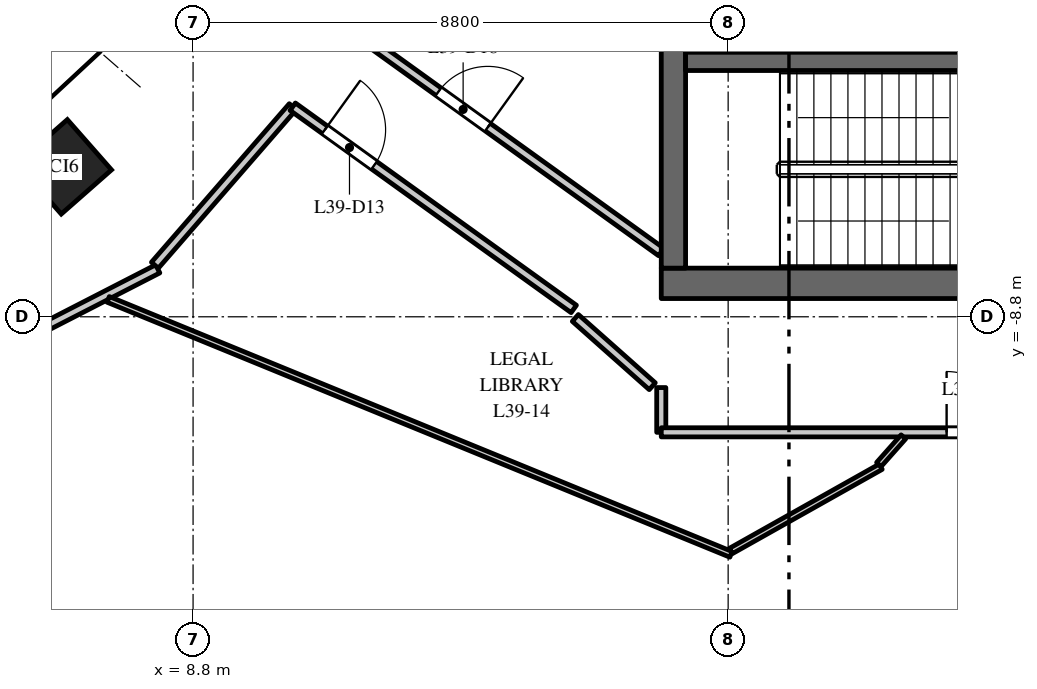
"""IFC4 building model, lengths in metres.
Left out: names, types, materials, properties, quantities, classifications, styles, units other than length and angle.
Written with IfcOpenShell. Run it as: python <this file> out.ifc"""

import sys

from ifc_helpers import new_model, si_unit, direction, frame, frame_2d, origin, origin_2d, place, context, subcontext, project, spatial, rectangle, extrude, element, fill, save


model = new_model("IFC4")
c1 = context("Model", 3, precision=1e-05, world=origin(), true_north=direction((0.0, 1.0)))
c2 = subcontext(c1, "Body", "Model", "MODEL_VIEW")
j1 = project(units=[si_unit("LENGTHUNIT", "METRE"), si_unit("PLANEANGLEUNIT", "RADIAN")], contexts=[c1])
p1 = place(None, origin())
s1 = spatial("IfcSite", under=j1, at=p1, CompositionType="ELEMENT")
p2 = place(p1, origin())
s2 = spatial("IfcBuilding", under=s1, at=p2, CompositionType="ELEMENT")
p3 = place(p2, frame((0.0, 0.0, 170.0)))
s3 = spatial("IfcBuildingStorey", under=s2, at=p3, CompositionType="ELEMENT", Elevation=170.0)
p4 = place(p3, frame((6.682, -6.334, 0.0), z_axis=(0.0, 0.0, 1.0), x_axis=(0.75102249095, 0.660276622399, 0.0)))
e1 = element("IfcColumn", 1, at=p4, inside=s3, PredefinedType="COLUMN", context=c2, shape_type="SweptSolid", body=[
    extrude(rectangle(XDim=1.1, YDim=1.1, at=origin_2d()), origin(), (0.0, 0.0, 1.0), 4.0),
])
p5 = place(p3, frame((16.5, -8.25, 0.0), z_axis=(0.0, 0.0, 1.0), x_axis=(1.0, 0.0, 0.0)))
e2 = element("IfcWall", 2, at=p5, inside=s3, PredefinedType="SHEAR", context=c2, shape_type="SweptSolid", body=[
    extrude(rectangle(XDim=15.0, YDim=0.5, at=frame_2d((7.5, 0.0))), origin(), (0.0, 0.0, 1.0), 3.7),
])
p6 = place(p5, frame((6.9, 0.0, 0.0)))
e3 = element("IfcOpeningElement", 3, at=p6, cuts=e2, PredefinedType="OPENING", context=c2, shape_type="SweptSolid", body=[
    extrude(rectangle(XDim=1.2, YDim=2.1, at=frame_2d((0.6, 1.05))), frame((0.0, 0.26, 0.0), z_axis=(0.0, -1.0, 0.0), x_axis=(1.0, 0.0, 0.0)), (0.0, 0.0, 1.0), 0.52),
])
p7 = place(p5, frame((12.275, 0.0, 0.0)))
e4 = element("IfcOpeningElement", 4, at=p7, cuts=e2, PredefinedType="OPENING", context=c2, shape_type="SweptSolid", body=[
    extrude(rectangle(XDim=0.9, YDim=2.1, at=frame_2d((0.45, 1.05))), frame((0.0, 0.26, 0.0), z_axis=(0.0, -1.0, 0.0), x_axis=(1.0, 0.0, 0.0)), (0.0, 0.0, 1.0), 0.52),
])
p8 = place(p3, frame((19.95, -4.45, 0.0), z_axis=(0.0, 0.0, 1.0), x_axis=(0.0, 1.0, 0.0)))
e5 = element("IfcWall", 5, at=p8, inside=s3, PredefinedType="SHEAR", context=c2, shape_type="SweptSolid", body=[
    extrude(rectangle(XDim=8.9, YDim=0.3, at=frame_2d((4.45, 0.0))), origin(), (0.0, 0.0, 1.0), 3.7),
])
p9 = place(p8, frame((0.775, 0.0, 0.0)))
e6 = element("IfcOpeningElement", 6, at=p9, cuts=e5, PredefinedType="OPENING", context=c2, shape_type="SweptSolid", body=[
    extrude(rectangle(XDim=1.2, YDim=2.1, at=frame_2d((0.6, 1.05))), frame((0.0, 0.16, 0.0), z_axis=(0.0, -1.0, 0.0), x_axis=(1.0, 0.0, 0.0)), (0.0, 0.0, 1.0), 0.32),
])
p10 = place(p8, frame((4.675, 0.0, 0.0)))
e7 = element("IfcOpeningElement", 7, at=p10, cuts=e5, PredefinedType="OPENING", context=c2, shape_type="SweptSolid", body=[
    extrude(rectangle(XDim=1.1, YDim=2.1, at=frame_2d((0.55, 1.05))), frame((0.0, 0.16, 0.0), z_axis=(0.0, -1.0, 0.0), x_axis=(1.0, 0.0, 0.0)), (0.0, 0.0, 1.0), 0.32),
])
p11 = place(p8, frame((7.25, 0.0, 0.0)))
e8 = element("IfcOpeningElement", 8, at=p11, cuts=e5, PredefinedType="OPENING", context=c2, shape_type="SweptSolid", body=[
    extrude(rectangle(XDim=1.1, YDim=2.1, at=frame_2d((0.55, 1.05))), frame((0.0, 0.16, 0.0), z_axis=(0.0, -1.0, 0.0), x_axis=(1.0, 0.0, 0.0)), (0.0, 0.0, 1.0), 0.32),
])
p12 = place(p3, frame((16.7, -8.0, 0.0), z_axis=(0.0, 0.0, 1.0), x_axis=(0.0, 1.0, 0.0)))
e9 = element("IfcWall", 9, at=p12, inside=s3, PredefinedType="SHEAR", context=c2, shape_type="SweptSolid", body=[
    extrude(rectangle(XDim=16.0, YDim=0.4, at=frame_2d((8.0, 0.0))), origin(), (0.0, 0.0, 1.0), 3.7),
])
p13 = place(p3, frame((16.9, -4.6, 0.0), z_axis=(0.0, 0.0, 1.0), x_axis=(1.0, 0.0, 0.0)))
e10 = element("IfcWall", 10, at=p13, inside=s3, PredefinedType="SHEAR", context=c2, shape_type="SweptSolid", body=[
    extrude(rectangle(XDim=6.18, YDim=0.3, at=frame_2d((3.09, 0.0))), origin(), (0.0, 0.0, 1.0), 3.7),
])
p14 = place(p13, frame((4.9, 0.0, 0.0)))
e11 = element("IfcOpeningElement", 11, at=p14, cuts=e10, PredefinedType="OPENING", context=c2, shape_type="SweptSolid", body=[
    extrude(rectangle(XDim=1.1, YDim=2.1, at=frame_2d((0.55, 1.05))), frame((0.0, 0.16, 0.0), z_axis=(0.0, -1.0, 0.0), x_axis=(1.0, 0.0, 0.0)), (0.0, 0.0, 1.0), 0.32),
])
p15 = place(p3, frame((4.367, -9.991, 0.0), z_axis=(0.0, 0.0, 1.0), x_axis=(0.889480321924, 0.456973475061, 0.0)))
e12 = element("IfcWall", 12, at=p15, inside=s3, PredefinedType="PARTITIONING", context=c2, shape_type="SweptSolid", body=[
    extrude(rectangle(XDim=4.331, YDim=0.15, at=frame_2d((2.165, 0.0))), origin(), (0.0, 0.0, 1.0), 2.85),
])
p16 = place(p3, frame((7.404, -8.514, 0.0), z_axis=(0.0, 0.0, 1.0), x_axis=(0.925457330517, -0.37885185679, 0.0)))
e13 = element("IfcWall", 13, at=p16, inside=s3, PredefinedType="PARTITIONING", context=c2, shape_type="SweptSolid", body=[
    extrude(rectangle(XDim=11.068, YDim=0.1, at=frame_2d((5.534, 0.0))), origin(), (0.0, 0.0, 1.0), 3.7),
])
p17 = place(p3, frame((8.172, -7.952, 0.0), z_axis=(0.0, 0.0, 1.0), x_axis=(0.656169966724, 0.754613129206, 0.0)))
e14 = element("IfcWall", 14, at=p17, inside=s3, PredefinedType="PARTITIONING", context=c2, shape_type="SweptSolid", body=[
    extrude(rectangle(XDim=3.455, YDim=0.15, at=frame_2d((1.727, 0.0))), origin(), (0.0, 0.0, 1.0), 2.75),
])
p18 = place(p3, frame((10.439, -5.345, 0.0), z_axis=(0.0, 0.0, 1.0), x_axis=(0.811697765448, -0.584077681106, 0.0)))
e15 = element("IfcWall", 15, at=p18, inside=s3, PredefinedType="PARTITIONING", context=c2, shape_type="SweptSolid", body=[
    extrude(rectangle(XDim=5.694, YDim=0.15, at=frame_2d((2.847, 0.0))), origin(), (0.0, 0.0, 1.0), 2.75),
])
p19 = place(p18, frame((0.65, 0.0, 0.0)))
e16 = element("IfcOpeningElement", 16, at=p19, cuts=e15, PredefinedType="OPENING", context=c2, shape_type="SweptSolid", body=[
    extrude(rectangle(XDim=1.0, YDim=2.1, at=frame_2d((0.5, 1.05))), frame((0.0, 0.085, 0.0), z_axis=(0.0, -1.0, 0.0), x_axis=(1.0, 0.0, 0.0)), (0.0, 0.0, 1.0), 0.17),
])
p20 = place(p3, frame((11.291, -3.986, 0.0), z_axis=(0.0, 0.0, 1.0), x_axis=(0.81164111506, -0.584156400584, 0.0)))
e17 = element("IfcWall", 17, at=p20, inside=s3, PredefinedType="PARTITIONING", context=c2, shape_type="SweptSolid", body=[
    extrude(rectangle(XDim=6.418, YDim=0.15, at=frame_2d((3.209, 0.0))), origin(), (0.0, 0.0, 1.0), 3.7),
])
p21 = place(p20, frame((1.903, 0.0, 0.0)))
e18 = element("IfcOpeningElement", 18, at=p21, cuts=e17, PredefinedType="OPENING", context=c2, shape_type="SweptSolid", body=[
    extrude(rectangle(XDim=1.0, YDim=2.1, at=frame_2d((0.5, 1.05))), frame((0.0, 0.085, 0.0), z_axis=(0.0, -1.0, 0.0), x_axis=(1.0, 0.0, 0.0)), (0.0, 0.0, 1.0), 0.17),
])
p22 = place(p3, frame((16.5, -10.7, 0.0), z_axis=(0.0, 0.0, 1.0), x_axis=(0.0, 1.0, 0.0)))
e19 = element("IfcWall", 19, at=p22, inside=s3, PredefinedType="PARTITIONING", context=c2, shape_type="SweptSolid", body=[
    extrude(rectangle(XDim=0.736, YDim=0.15, at=frame_2d((0.368, 0.0))), origin(), (0.0, 0.0, 1.0), 3.7),
])
p23 = place(p3, frame((16.5, -10.7, 0.0), z_axis=(0.0, 0.0, 1.0), x_axis=(1.0, 0.0, 0.0)))
e20 = element("IfcWall", 20, at=p23, inside=s3, PredefinedType="PARTITIONING", context=c2, shape_type="SweptSolid", body=[
    extrude(rectangle(XDim=15.0, YDim=0.15, at=frame_2d((7.5, 0.0))), origin(), (0.0, 0.0, 1.0), 2.75),
])
p24 = place(p23, frame((4.693, 0.0, 0.0)))
e21 = element("IfcOpeningElement", 21, at=p24, cuts=e20, PredefinedType="OPENING", context=c2, shape_type="SweptSolid", body=[
    extrude(rectangle(XDim=1.0, YDim=2.1, at=frame_2d((0.5, 1.05))), frame((0.0, 0.085, 0.0), z_axis=(0.0, -1.0, 0.0), x_axis=(1.0, 0.0, 0.0)), (0.0, 0.0, 1.0), 0.17),
])
p25 = place(p3, frame((17.644, -12.652, 0.0), z_axis=(0.0, 0.0, 1.0), x_axis=(0.871649310038, 0.490130064687, 0.0)))
e22 = element("IfcWall", 22, at=p25, inside=s3, PredefinedType="PARTITIONING", context=c2, shape_type="SweptSolid", body=[
    extrude(rectangle(XDim=2.828, YDim=0.1, at=frame_2d((1.414, 0.0))), origin(), (0.0, 0.0, 1.0), 3.7),
])
p26 = place(p3, frame((20.079, -11.229, 0.0), z_axis=(0.0, 0.0, 1.0), x_axis=(0.663614598559, 0.748074638375, 0.0)))
e23 = element("IfcWall", 23, at=p26, inside=s3, PredefinedType="PARTITIONING", context=c2, shape_type="SweptSolid", body=[
    extrude(rectangle(XDim=0.607, YDim=0.1, at=frame_2d((0.303, 0.0))), origin(), (0.0, 0.0, 1.0), 2.75),
])
p27 = place(p3, frame((16.352, -9.942, 0.0), z_axis=(0.0, 0.0, 1.0), x_axis=(-0.747926695066, 0.663781333579, 0.0)))
e24 = element("IfcWall", 24, at=p27, inside=s3, PredefinedType="PARTITIONING", context=c2, shape_type="SweptSolid", body=[
    extrude(rectangle(XDim=1.691, YDim=0.15, at=frame_2d((0.846, 0.0))), origin(), (0.0, 0.0, 1.0), 3.7),
])
p28 = place(p24, origin())
e25 = element("IfcDoor", 25, at=p28, inside=s3, OperationType="SINGLE_SWING_LEFT", PredefinedType="DOOR", context=c2, shape_type="SweptSolid", body=[
    extrude(rectangle(XDim=1.0, YDim=2.1, at=frame_2d((0.5, 1.05))), frame((0.0, 0.025, 0.0), z_axis=(0.0, -1.0, 0.0), x_axis=(1.0, 0.0, 0.0)), (0.0, 0.0, 1.0), 0.05),
])
fill(e21, e25)
p29 = place(p19, origin())
e26 = element("IfcDoor", 26, at=p29, inside=s3, OperationType="SINGLE_SWING_LEFT", PredefinedType="DOOR", context=c2, shape_type="SweptSolid", body=[
    extrude(rectangle(XDim=1.0, YDim=2.1, at=frame_2d((0.5, 1.05))), frame((0.0, 0.025, 0.0), z_axis=(0.0, -1.0, 0.0), x_axis=(1.0, 0.0, 0.0)), (0.0, 0.0, 1.0), 0.05),
])
fill(e16, e26)
p30 = place(p21, origin())
e27 = element("IfcDoor", 27, at=p30, inside=s3, OperationType="SINGLE_SWING_RIGHT", PredefinedType="DOOR", context=c2, shape_type="SweptSolid", body=[
    extrude(rectangle(XDim=1.0, YDim=2.1, at=frame_2d((0.5, 1.05))), frame((0.0, 0.025, 0.0), z_axis=(0.0, -1.0, 0.0), x_axis=(1.0, 0.0, 0.0)), (0.0, 0.0, 1.0), 0.05),
])
fill(e18, e27)
save(model, sys.argv[1])
